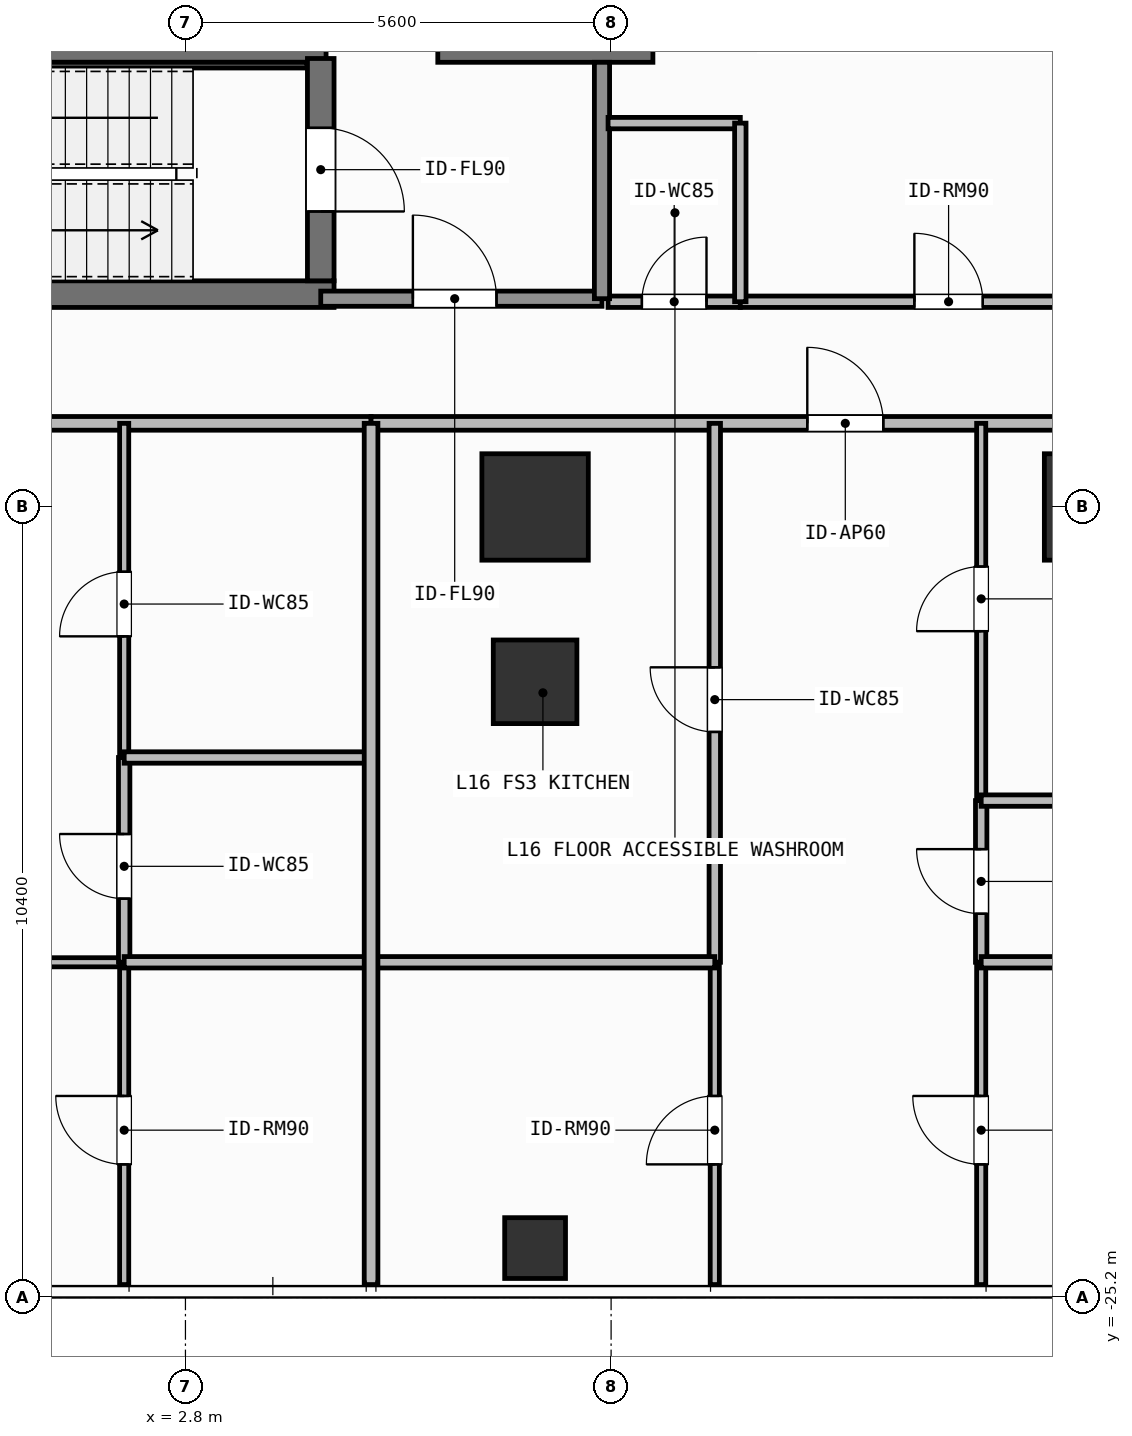
"""IFC4 building model, lengths in metres.
Left out: names, types, materials, properties, quantities, classifications, styles, units other than length and angle.
Written with IfcOpenShell. Run it as: python <this file> out.ifc"""

import sys

from ifc_helpers import new_model, si_unit, direction, frame, frame_2d, origin, origin_2d, place, context, subcontext, project, spatial, rectangle, hollow_rectangle, extrude, element, fill, save


model = new_model("IFC4")
c1 = context("Model", 3, precision=1e-05, world=origin(), true_north=direction((0.0, 1.0)))
c2 = subcontext(c1, "Body", "Model", "MODEL_VIEW")
j1 = project(units=[si_unit("LENGTHUNIT", "METRE"), si_unit("PLANEANGLEUNIT", "RADIAN")], contexts=[c1])
p1 = place(None, origin())
s1 = spatial("IfcSite", under=j1, at=p1, CompositionType="ELEMENT")
p2 = place(p1, origin())
s2 = spatial("IfcBuilding", under=s1, at=p2, CompositionType="ELEMENT")
p3 = place(p2, frame((0.0, 0.0, 61.8)))
s3 = spatial("IfcBuildingStorey", under=s2, at=p3, CompositionType="ELEMENT", Elevation=61.8)
p4 = place(p3, frame((-2.62, -8.4, 0.0), z_axis=(0.0, 0.0, 1.0), x_axis=(1.0, 0.0, 0.0)))
e1 = element("IfcWall", 1, at=p4, inside=s3, PredefinedType="SHEAR", context=c2, shape_type="SweptSolid", body=[
    extrude(rectangle(XDim=7.27, YDim=1.1, at=frame_2d((3.635, 0.0))), origin(), (0.0, 0.0, 1.0), 3.9),
])
p5 = place(p3, frame((6.12, -8.4, 0.0), z_axis=(0.0, 0.0, 1.0), x_axis=(1.0, 0.0, 0.0)))
e2 = element("IfcWall", 2, at=p5, inside=s3, PredefinedType="SHEAR", context=c2, shape_type="SweptSolid", body=[
    extrude(rectangle(XDim=2.83, YDim=1.1, at=frame_2d((1.415, 0.0))), origin(), (0.0, 0.0, 1.0), 3.9),
])
p6 = place(p3, frame((-2.555, -12.0, 0.0), z_axis=(0.0, 0.0, 1.0), x_axis=(1.0, 0.0, 0.0)))
e3 = element("IfcWall", 3, at=p6, inside=s3, PredefinedType="SHEAR", context=c2, shape_type="SweptSolid", body=[
    extrude(rectangle(XDim=7.31, YDim=0.35, at=frame_2d((3.655, 0.0))), origin(), (0.0, 0.0, 1.0), 3.9),
])
p7 = place(p3, frame((-2.2, -8.988, 0.0), z_axis=(0.0, 0.0, 1.0), x_axis=(1.0, 0.0, 0.0)))
e4 = element("IfcWall", 4, at=p7, inside=s3, PredefinedType="SHEAR", context=c2, shape_type="SweptSolid", body=[
    extrude(rectangle(XDim=6.6, YDim=0.075, at=frame_2d((3.3, 0.0))), origin(), (0.0, 0.0, 1.0), 3.9),
])
p8 = place(p3, frame((4.58, -8.9, 0.0), z_axis=(0.0, 0.0, 1.0), x_axis=(0.0, -1.0, 0.0)))
e5 = element("IfcWall", 5, at=p8, inside=s3, PredefinedType="SHEAR", context=c2, shape_type="SweptSolid", body=[
    extrude(rectangle(XDim=2.925, YDim=0.35, at=frame_2d((1.462, 0.0))), origin(), (0.0, 0.0, 1.0), 3.9),
])
p9 = place(p8, frame((0.913, 0.0, 0.0)))
e6 = element("IfcOpeningElement", 6, at=p9, cuts=e5, PredefinedType="OPENING", context=c2, shape_type="SweptSolid", body=[
    extrude(rectangle(XDim=1.1, YDim=2.15, at=frame_2d((0.55, 1.075))), frame((0.0, 0.185, 0.0), z_axis=(0.0, -1.0, 0.0), x_axis=(1.0, 0.0, 0.0)), (0.0, 0.0, 1.0), 0.37),
])
for number, where, z_axis, x_axis in (
    (7, (7.4, -14.8, 0.0), (0.0, 0.0, 1.0), (1.0, 0.0, 0.0)),
    (8, (14.8, -14.8, 0.0), (0.0, 0.0, 1.0), (1.0, 0.0, 0.0)),
):
    element("IfcColumn", number, at=place(p3, frame(where, z_axis=z_axis, x_axis=x_axis)), inside=s3, PredefinedType="COLUMN", context=c2, shape_type="SweptSolid", body=[
        extrude(rectangle(XDim=1.4, YDim=1.4, at=origin_2d()), origin(), (0.0, 0.0, 1.0), 3.9),
    ])
p10 = place(p3, frame((7.4, -17.1, 0.0), z_axis=(0.0, 0.0, 1.0), x_axis=(1.0, 0.0, 0.0)))
e9 = element("IfcColumn", 9, at=p10, inside=s3, PredefinedType="COLUMN", context=c2, shape_type="SweptSolid", body=[
    extrude(rectangle(XDim=1.1, YDim=1.1, at=origin_2d()), origin(), (0.0, 0.0, 1.0), 3.9),
])
p11 = place(p3, frame((7.4, -24.55, 0.0), z_axis=(0.0, 0.0, 1.0), x_axis=(1.0, 0.0, 0.0)))
e10 = element("IfcColumn", 10, at=p11, inside=s3, PredefinedType="COLUMN", context=c2, shape_type="SweptSolid", body=[
    extrude(hollow_rectangle(XDim=0.8, YDim=0.8, WallThickness=0.036, at=origin_2d()), origin(), (0.0, 0.0, 1.0), 3.9),
])
p12 = place(p3, frame((4.58, -12.06, 0.0), z_axis=(0.0, 0.0, 1.0), x_axis=(1.0, 0.0, 0.0)))
e11 = element("IfcWall", 11, at=p12, inside=s3, PredefinedType="SOLIDWALL", context=c2, shape_type="SweptSolid", body=[
    extrude(rectangle(XDim=3.7, YDim=0.2, at=frame_2d((1.85, 0.0))), origin(), (0.0, 0.0, 1.0), 3.68),
])
p13 = place(p12, frame((1.212, 0.0, 0.0)))
e12 = element("IfcOpeningElement", 12, at=p13, cuts=e11, PredefinedType="OPENING", context=c2, shape_type="SweptSolid", body=[
    extrude(rectangle(XDim=1.1, YDim=2.15, at=frame_2d((0.55, 1.075))), frame((0.0, 0.11, 0.0), z_axis=(0.0, -1.0, 0.0), x_axis=(1.0, 0.0, 0.0)), (0.0, 0.0, 1.0), 0.22),
])
p14 = place(p3, frame((8.36, -12.1, 0.0), z_axis=(0.0, 0.0, 1.0), x_axis=(1.0, 0.0, 0.0)))
e13 = element("IfcWall", 13, at=p14, inside=s3, PredefinedType="PARTITIONING", context=c2, shape_type="SweptSolid", body=[
    extrude(rectangle(XDim=1.74, YDim=0.15, at=frame_2d((0.87, 0.0))), origin(), (0.0, 0.0, 1.0), 3.68),
])
p15 = place(p14, frame((0.445, 0.0, 0.0)))
e14 = element("IfcOpeningElement", 14, at=p15, cuts=e13, PredefinedType="OPENING", context=c2, shape_type="SweptSolid", body=[
    extrude(rectangle(XDim=0.85, YDim=2.1, at=frame_2d((0.425, 1.05))), frame((0.0, 0.085, 0.0), z_axis=(0.0, -1.0, 0.0), x_axis=(1.0, 0.0, 0.0)), (0.0, 0.0, 1.0), 0.17),
])
p16 = place(p3, frame((10.1, -12.1, 0.0), z_axis=(0.0, 0.0, 1.0), x_axis=(1.0, 0.0, 0.0)))
e15 = element("IfcWall", 15, at=p16, inside=s3, PredefinedType="PARTITIONING", context=c2, shape_type="SweptSolid", body=[
    extrude(rectangle(XDim=5.48, YDim=0.15, at=frame_2d((2.74, 0.0))), origin(), (0.0, 0.0, 1.0), 3.68),
])
p17 = place(p16, frame((2.29, 0.0, 0.0)))
e16 = element("IfcOpeningElement", 16, at=p17, cuts=e15, PredefinedType="OPENING", context=c2, shape_type="SweptSolid", body=[
    extrude(rectangle(XDim=0.9, YDim=2.1, at=frame_2d((0.45, 1.05))), frame((0.0, 0.085, 0.0), z_axis=(0.0, -1.0, 0.0), x_axis=(1.0, 0.0, 0.0)), (0.0, 0.0, 1.0), 0.17),
])
p18 = place(p3, frame((-12.225, -13.7, 0.0), z_axis=(0.0, 0.0, 1.0), x_axis=(1.0, 0.0, 0.0)))
e17 = element("IfcWall", 17, at=p18, inside=s3, PredefinedType="PARTITIONING", context=c2, shape_type="SweptSolid", body=[
    extrude(rectangle(XDim=17.467, YDim=0.18, at=frame_2d((8.733, 0.0))), origin(), (0.0, 0.0, 1.0), 3.68),
])
p19 = place(p18, frame((9.848, 0.0, 0.0)))
e18 = element("IfcOpeningElement", 18, at=p19, cuts=e17, PredefinedType="OPENING", context=c2, shape_type="SweptSolid", body=[
    extrude(rectangle(XDim=1.0, YDim=2.2, at=frame_2d((0.5, 1.1))), frame((0.0, 0.1, 0.0), z_axis=(0.0, -1.0, 0.0), x_axis=(1.0, 0.0, 0.0)), (0.0, 0.0, 1.0), 0.2),
])
p20 = place(p3, frame((-5.477, -20.79, 0.0), z_axis=(0.0, 0.0, 1.0), x_axis=(1.0, 0.0, 0.0)))
e19 = element("IfcWall", 19, at=p20, inside=s3, PredefinedType="PARTITIONING", context=c2, shape_type="SweptSolid", body=[
    extrude(rectangle(XDim=7.471, YDim=0.12, at=frame_2d((3.735, 0.0))), origin(), (0.0, 0.0, 1.0), 3.68),
])
p21 = place(p20, frame((3.375, 0.0, 0.0)))
e20 = element("IfcOpeningElement", 20, at=p21, cuts=e19, PredefinedType="OPENING", context=c2, shape_type="SweptSolid", body=[
    extrude(rectangle(XDim=0.9, YDim=2.1, at=frame_2d((0.45, 1.05))), frame((0.0, 0.07, 0.0), z_axis=(0.0, -1.0, 0.0), x_axis=(1.0, 0.0, 0.0)), (0.0, 0.0, 1.0), 0.14),
])
p22 = place(p3, frame((1.994, -20.79, 0.0), z_axis=(0.0, 0.0, 1.0), x_axis=(0.0, 1.0, 0.0)))
e21 = element("IfcWall", 21, at=p22, inside=s3, PredefinedType="PARTITIONING", context=c2, shape_type="SweptSolid", body=[
    extrude(rectangle(XDim=2.694, YDim=0.15, at=frame_2d((1.347, 0.0))), origin(), (0.0, 0.0, 1.0), 3.68),
])
p23 = place(p22, frame((0.837, 0.0, 0.0)))
e22 = element("IfcOpeningElement", 22, at=p23, cuts=e21, PredefinedType="OPENING", context=c2, shape_type="SweptSolid", body=[
    extrude(rectangle(XDim=0.85, YDim=2.1, at=frame_2d((0.425, 1.05))), frame((0.0, 0.085, 0.0), z_axis=(0.0, -1.0, 0.0), x_axis=(1.0, 0.0, 0.0)), (0.0, 0.0, 1.0), 0.17),
])
p24 = place(p3, frame((1.994, -18.096, 0.0), z_axis=(0.0, 0.0, 1.0), x_axis=(0.0, 1.0, 0.0)))
e23 = element("IfcWall", 23, at=p24, inside=s3, PredefinedType="PARTITIONING", context=c2, shape_type="SweptSolid", body=[
    extrude(rectangle(XDim=4.396, YDim=0.12, at=frame_2d((2.198, 0.0))), origin(), (0.0, 0.0, 1.0), 3.68),
])
p25 = place(p24, frame((1.594, 0.0, 0.0)))
e24 = element("IfcOpeningElement", 24, at=p25, cuts=e23, PredefinedType="OPENING", context=c2, shape_type="SweptSolid", body=[
    extrude(rectangle(XDim=0.85, YDim=2.1, at=frame_2d((0.425, 1.05))), frame((0.0, 0.07, 0.0), z_axis=(0.0, -1.0, 0.0), x_axis=(1.0, 0.0, 0.0)), (0.0, 0.0, 1.0), 0.14),
])
p26 = place(p3, frame((1.994, -25.03, 0.0), z_axis=(0.0, 0.0, 1.0), x_axis=(0.0, 1.0, 0.0)))
e25 = element("IfcWall", 25, at=p26, inside=s3, PredefinedType="PARTITIONING", context=c2, shape_type="SweptSolid", body=[
    extrude(rectangle(XDim=4.24, YDim=0.12, at=frame_2d((2.12, 0.0))), origin(), (0.0, 0.0, 1.0), 3.68),
])
p27 = place(p26, frame((1.581, 0.0, 0.0)))
e26 = element("IfcOpeningElement", 26, at=p27, cuts=e25, PredefinedType="OPENING", context=c2, shape_type="SweptSolid", body=[
    extrude(rectangle(XDim=0.9, YDim=2.1, at=frame_2d((0.45, 1.05))), frame((0.0, 0.07, 0.0), z_axis=(0.0, -1.0, 0.0), x_axis=(1.0, 0.0, 0.0)), (0.0, 0.0, 1.0), 0.14),
])
p28 = place(p3, frame((5.242, -13.7, 0.0), z_axis=(0.0, 0.0, 1.0), x_axis=(1.0, 0.0, 0.0)))
e27 = element("IfcWall", 27, at=p28, inside=s3, PredefinedType="PARTITIONING", context=c2, shape_type="SweptSolid", body=[
    extrude(rectangle(XDim=13.378, YDim=0.18, at=frame_2d((6.689, 0.0))), origin(), (0.0, 0.0, 1.0), 3.68),
])
p29 = place(p28, frame((5.739, 0.0, 0.0)))
e28 = element("IfcOpeningElement", 28, at=p29, cuts=e27, PredefinedType="OPENING", context=c2, shape_type="SweptSolid", body=[
    extrude(rectangle(XDim=1.0, YDim=2.2, at=frame_2d((0.5, 1.1))), frame((0.0, 0.1, 0.0), z_axis=(0.0, -1.0, 0.0), x_axis=(1.0, 0.0, 0.0)), (0.0, 0.0, 1.0), 0.2),
])
p30 = place(p3, frame((9.764, -20.79, 0.0), z_axis=(0.0, 0.0, 1.0), x_axis=(0.0, 1.0, 0.0)))
e29 = element("IfcWall", 29, at=p30, inside=s3, PredefinedType="PARTITIONING", context=c2, shape_type="SweptSolid", body=[
    extrude(rectangle(XDim=7.09, YDim=0.15, at=frame_2d((3.545, 0.0))), origin(), (0.0, 0.0, 1.0), 3.68),
])
p31 = place(p30, frame((3.03, 0.0, 0.0)))
e30 = element("IfcOpeningElement", 30, at=p31, cuts=e29, PredefinedType="OPENING", context=c2, shape_type="SweptSolid", body=[
    extrude(rectangle(XDim=0.85, YDim=2.1, at=frame_2d((0.425, 1.05))), frame((0.0, 0.085, 0.0), z_axis=(0.0, -1.0, 0.0), x_axis=(1.0, 0.0, 0.0)), (0.0, 0.0, 1.0), 0.17),
])
p32 = place(p3, frame((9.764, -25.03, 0.0), z_axis=(0.0, 0.0, 1.0), x_axis=(0.0, 1.0, 0.0)))
e31 = element("IfcWall", 31, at=p32, inside=s3, PredefinedType="PARTITIONING", context=c2, shape_type="SweptSolid", body=[
    extrude(rectangle(XDim=4.24, YDim=0.12, at=frame_2d((2.12, 0.0))), origin(), (0.0, 0.0, 1.0), 3.68),
])
p33 = place(p32, frame((1.581, 0.0, 0.0)))
e32 = element("IfcOpeningElement", 32, at=p33, cuts=e31, PredefinedType="OPENING", context=c2, shape_type="SweptSolid", body=[
    extrude(rectangle(XDim=0.9, YDim=2.1, at=frame_2d((0.45, 1.05))), frame((0.0, 0.07, 0.0), z_axis=(0.0, -1.0, 0.0), x_axis=(1.0, 0.0, 0.0)), (0.0, 0.0, 1.0), 0.14),
])
p34 = place(p3, frame((13.269, -20.79, 0.0), z_axis=(0.0, 0.0, 1.0), x_axis=(0.0, 1.0, 0.0)))
e33 = element("IfcWall", 33, at=p34, inside=s3, PredefinedType="PARTITIONING", context=c2, shape_type="SweptSolid", body=[
    extrude(rectangle(XDim=2.127, YDim=0.15, at=frame_2d((1.063, 0.0))), origin(), (0.0, 0.0, 1.0), 3.68),
])
p35 = place(p34, frame((0.638, 0.0, 0.0)))
e34 = element("IfcOpeningElement", 34, at=p35, cuts=e33, PredefinedType="OPENING", context=c2, shape_type="SweptSolid", body=[
    extrude(rectangle(XDim=0.85, YDim=2.1, at=frame_2d((0.425, 1.05))), frame((0.0, 0.085, 0.0), z_axis=(0.0, -1.0, 0.0), x_axis=(1.0, 0.0, 0.0)), (0.0, 0.0, 1.0), 0.17),
])
p36 = place(p3, frame((13.269, -18.663, 0.0), z_axis=(0.0, 0.0, 1.0), x_axis=(0.0, 1.0, 0.0)))
e35 = element("IfcWall", 35, at=p36, inside=s3, PredefinedType="PARTITIONING", context=c2, shape_type="SweptSolid", body=[
    extrude(rectangle(XDim=4.963, YDim=0.12, at=frame_2d((2.481, 0.0))), origin(), (0.0, 0.0, 1.0), 3.68),
])
p37 = place(p36, frame((2.229, 0.0, 0.0)))
e36 = element("IfcOpeningElement", 36, at=p37, cuts=e35, PredefinedType="OPENING", context=c2, shape_type="SweptSolid", body=[
    extrude(rectangle(XDim=0.85, YDim=2.1, at=frame_2d((0.425, 1.05))), frame((0.0, 0.07, 0.0), z_axis=(0.0, -1.0, 0.0), x_axis=(1.0, 0.0, 0.0)), (0.0, 0.0, 1.0), 0.14),
])
p38 = place(p3, frame((13.269, -25.03, 0.0), z_axis=(0.0, 0.0, 1.0), x_axis=(0.0, 1.0, 0.0)))
e37 = element("IfcWall", 37, at=p38, inside=s3, PredefinedType="PARTITIONING", context=c2, shape_type="SweptSolid", body=[
    extrude(rectangle(XDim=4.24, YDim=0.12, at=frame_2d((2.12, 0.0))), origin(), (0.0, 0.0, 1.0), 3.68),
])
p39 = place(p38, frame((1.581, 0.0, 0.0)))
e38 = element("IfcOpeningElement", 38, at=p39, cuts=e37, PredefinedType="OPENING", context=c2, shape_type="SweptSolid", body=[
    extrude(rectangle(XDim=0.9, YDim=2.1, at=frame_2d((0.45, 1.05))), frame((0.0, 0.07, 0.0), z_axis=(0.0, -1.0, 0.0), x_axis=(1.0, 0.0, 0.0)), (0.0, 0.0, 1.0), 0.14),
])
p40 = place(p3, frame((8.28, -12.06, 0.0), z_axis=(0.0, 0.0, 1.0), x_axis=(0.0, 1.0, 0.0)))
e39 = element("IfcWall", 39, at=p40, inside=s3, PredefinedType="SOLIDWALL", context=c2, shape_type="SweptSolid", body=[
    extrude(rectangle(XDim=3.11, YDim=0.2, at=frame_2d((1.555, 0.0))), origin(), (0.0, 0.0, 1.0), 3.68),
])
p41 = place(p3, frame((8.36, -9.75, 0.0), z_axis=(0.0, 0.0, 1.0), x_axis=(1.0, 0.0, 0.0)))
e40 = element("IfcWall", 40, at=p41, inside=s3, PredefinedType="PARTITIONING", context=c2, shape_type="SweptSolid", body=[
    extrude(rectangle(XDim=1.74, YDim=0.15, at=frame_2d((0.87, 0.0))), origin(), (0.0, 0.0, 1.0), 3.68),
])
p42 = place(p3, frame((10.1, -12.1, 0.0), z_axis=(0.0, 0.0, 1.0), x_axis=(0.0, 1.0, 0.0)))
e41 = element("IfcWall", 41, at=p42, inside=s3, PredefinedType="PARTITIONING", context=c2, shape_type="SweptSolid", body=[
    extrude(rectangle(XDim=2.35, YDim=0.15, at=frame_2d((1.175, 0.0))), origin(), (0.0, 0.0, 1.0), 3.68),
])
for number, where, z_axis, x_axis in (
    (42, (1.994, -18.096, 0.0), (0.0, 0.0, 1.0), (1.0, 0.0, 0.0)),
    (43, (1.994, -20.79, 0.0), (0.0, 0.0, 1.0), (1.0, 0.0, 0.0)),
):
    element("IfcWall", number, at=place(p3, frame(where, z_axis=z_axis, x_axis=x_axis)), inside=s3, PredefinedType="PARTITIONING", context=c2, shape_type="SweptSolid", body=[
        extrude(rectangle(XDim=3.248, YDim=0.15, at=frame_2d((1.624, 0.0))), origin(), (0.0, 0.0, 1.0), 3.68),
    ])
p43 = place(p3, frame((5.242, -20.79, 0.0), z_axis=(0.0, 0.0, 1.0), x_axis=(1.0, 0.0, 0.0)))
e44 = element("IfcWall", 44, at=p43, inside=s3, PredefinedType="PARTITIONING", context=c2, shape_type="SweptSolid", body=[
    extrude(rectangle(XDim=4.522, YDim=0.15, at=frame_2d((2.261, 0.0))), origin(), (0.0, 0.0, 1.0), 3.68),
])
for number, where, z_axis, x_axis in (
    (45, (13.269, -18.663, 0.0), (0.0, 0.0, 1.0), (1.0, 0.0, 0.0)),
    (46, (13.269, -20.79, 0.0), (0.0, 0.0, 1.0), (1.0, 0.0, 0.0)),
):
    element("IfcWall", number, at=place(p3, frame(where, z_axis=z_axis, x_axis=x_axis)), inside=s3, PredefinedType="PARTITIONING", context=c2, shape_type="SweptSolid", body=[
        extrude(rectangle(XDim=5.351, YDim=0.15, at=frame_2d((2.676, 0.0))), origin(), (0.0, 0.0, 1.0), 3.68),
    ])
p44 = place(p3, frame((5.242, -25.03, 0.0), z_axis=(0.0, 0.0, 1.0), x_axis=(0.0, 1.0, 0.0)))
e47 = element("IfcWall", 47, at=p44, inside=s3, PredefinedType="PARTITIONING", context=c2, shape_type="SweptSolid", body=[
    extrude(rectangle(XDim=11.33, YDim=0.18, at=frame_2d((5.665, 0.0))), origin(), (0.0, 0.0, 1.0), 3.68),
])
p45 = place(p9, origin())
e48 = element("IfcDoor", 48, at=p45, inside=s3, OperationType="SINGLE_SWING_RIGHT", PredefinedType="DOOR", context=c2, shape_type="SweptSolid", body=[
    extrude(rectangle(XDim=1.1, YDim=2.15, at=frame_2d((0.55, 1.075))), frame((0.0, 0.025, 0.0), z_axis=(0.0, -1.0, 0.0), x_axis=(1.0, 0.0, 0.0)), (0.0, 0.0, 1.0), 0.05),
])
fill(e6, e48)
p46 = place(p13, origin())
e49 = element("IfcDoor", 49, at=p46, inside=s3, OperationType="SINGLE_SWING_LEFT", PredefinedType="DOOR", context=c2, shape_type="SweptSolid", body=[
    extrude(rectangle(XDim=1.1, YDim=2.15, at=frame_2d((0.55, 1.075))), frame((0.0, 0.025, 0.0), z_axis=(0.0, -1.0, 0.0), x_axis=(1.0, 0.0, 0.0)), (0.0, 0.0, 1.0), 0.05),
])
fill(e12, e49)
p47 = place(p15, origin())
e50 = element("IfcDoor", 50, at=p47, inside=s3, OperationType="SINGLE_SWING_RIGHT", PredefinedType="DOOR", context=c2, shape_type="SweptSolid", body=[
    extrude(rectangle(XDim=0.85, YDim=2.1, at=frame_2d((0.425, 1.05))), frame((0.0, 0.025, 0.0), z_axis=(0.0, -1.0, 0.0), x_axis=(1.0, 0.0, 0.0)), (0.0, 0.0, 1.0), 0.05),
])
fill(e14, e50)
p48 = place(p17, origin())
e51 = element("IfcDoor", 51, at=p48, inside=s3, OperationType="SINGLE_SWING_LEFT", PredefinedType="DOOR", context=c2, shape_type="SweptSolid", body=[
    extrude(rectangle(XDim=0.9, YDim=2.1, at=frame_2d((0.45, 1.05))), frame((0.0, 0.025, 0.0), z_axis=(0.0, -1.0, 0.0), x_axis=(1.0, 0.0, 0.0)), (0.0, 0.0, 1.0), 0.05),
])
fill(e16, e51)
p49 = place(p23, origin())
e52 = element("IfcDoor", 52, at=p49, inside=s3, OperationType="SINGLE_SWING_RIGHT", PredefinedType="DOOR", context=c2, shape_type="SweptSolid", body=[
    extrude(rectangle(XDim=0.85, YDim=2.1, at=frame_2d((0.425, 1.05))), frame((0.0, 0.025, 0.0), z_axis=(0.0, -1.0, 0.0), x_axis=(1.0, 0.0, 0.0)), (0.0, 0.0, 1.0), 0.05),
])
fill(e22, e52)
p50 = place(p25, origin())
e53 = element("IfcDoor", 53, at=p50, inside=s3, OperationType="SINGLE_SWING_LEFT", PredefinedType="DOOR", context=c2, shape_type="SweptSolid", body=[
    extrude(rectangle(XDim=0.85, YDim=2.1, at=frame_2d((0.425, 1.05))), frame((0.0, 0.025, 0.0), z_axis=(0.0, -1.0, 0.0), x_axis=(1.0, 0.0, 0.0)), (0.0, 0.0, 1.0), 0.05),
])
fill(e24, e53)
p51 = place(p27, origin())
e54 = element("IfcDoor", 54, at=p51, inside=s3, OperationType="SINGLE_SWING_RIGHT", PredefinedType="DOOR", context=c2, shape_type="SweptSolid", body=[
    extrude(rectangle(XDim=0.9, YDim=2.1, at=frame_2d((0.45, 1.05))), frame((0.0, 0.025, 0.0), z_axis=(0.0, -1.0, 0.0), x_axis=(1.0, 0.0, 0.0)), (0.0, 0.0, 1.0), 0.05),
])
fill(e26, e54)
p52 = place(p29, origin())
e55 = element("IfcDoor", 55, at=p52, inside=s3, OperationType="SINGLE_SWING_LEFT", PredefinedType="DOOR", context=c2, shape_type="SweptSolid", body=[
    extrude(rectangle(XDim=1.0, YDim=2.2, at=frame_2d((0.5, 1.1))), frame((0.0, 0.025, 0.0), z_axis=(0.0, -1.0, 0.0), x_axis=(1.0, 0.0, 0.0)), (0.0, 0.0, 1.0), 0.05),
])
fill(e28, e55)
p53 = place(p31, origin())
e56 = element("IfcDoor", 56, at=p53, inside=s3, OperationType="SINGLE_SWING_RIGHT", PredefinedType="DOOR", context=c2, shape_type="SweptSolid", body=[
    extrude(rectangle(XDim=0.85, YDim=2.1, at=frame_2d((0.425, 1.05))), frame((0.0, 0.025, 0.0), z_axis=(0.0, -1.0, 0.0), x_axis=(1.0, 0.0, 0.0)), (0.0, 0.0, 1.0), 0.05),
])
fill(e30, e56)
p54 = place(p33, origin())
e57 = element("IfcDoor", 57, at=p54, inside=s3, OperationType="SINGLE_SWING_LEFT", PredefinedType="DOOR", context=c2, shape_type="SweptSolid", body=[
    extrude(rectangle(XDim=0.9, YDim=2.1, at=frame_2d((0.45, 1.05))), frame((0.0, 0.025, 0.0), z_axis=(0.0, -1.0, 0.0), x_axis=(1.0, 0.0, 0.0)), (0.0, 0.0, 1.0), 0.05),
])
fill(e32, e57)
p55 = place(p35, origin())
e58 = element("IfcDoor", 58, at=p55, inside=s3, OperationType="SINGLE_SWING_RIGHT", PredefinedType="DOOR", context=c2, shape_type="SweptSolid", body=[
    extrude(rectangle(XDim=0.85, YDim=2.1, at=frame_2d((0.425, 1.05))), frame((0.0, 0.025, 0.0), z_axis=(0.0, -1.0, 0.0), x_axis=(1.0, 0.0, 0.0)), (0.0, 0.0, 1.0), 0.05),
])
fill(e34, e58)
p56 = place(p37, origin())
e59 = element("IfcDoor", 59, at=p56, inside=s3, OperationType="SINGLE_SWING_LEFT", PredefinedType="DOOR", context=c2, shape_type="SweptSolid", body=[
    extrude(rectangle(XDim=0.85, YDim=2.1, at=frame_2d((0.425, 1.05))), frame((0.0, 0.025, 0.0), z_axis=(0.0, -1.0, 0.0), x_axis=(1.0, 0.0, 0.0)), (0.0, 0.0, 1.0), 0.05),
])
fill(e36, e59)
p57 = place(p39, origin())
e60 = element("IfcDoor", 60, at=p57, inside=s3, OperationType="SINGLE_SWING_RIGHT", PredefinedType="DOOR", context=c2, shape_type="SweptSolid", body=[
    extrude(rectangle(XDim=0.9, YDim=2.1, at=frame_2d((0.45, 1.05))), frame((0.0, 0.025, 0.0), z_axis=(0.0, -1.0, 0.0), x_axis=(1.0, 0.0, 0.0)), (0.0, 0.0, 1.0), 0.05),
])
fill(e38, e60)
save(model, sys.argv[1])
